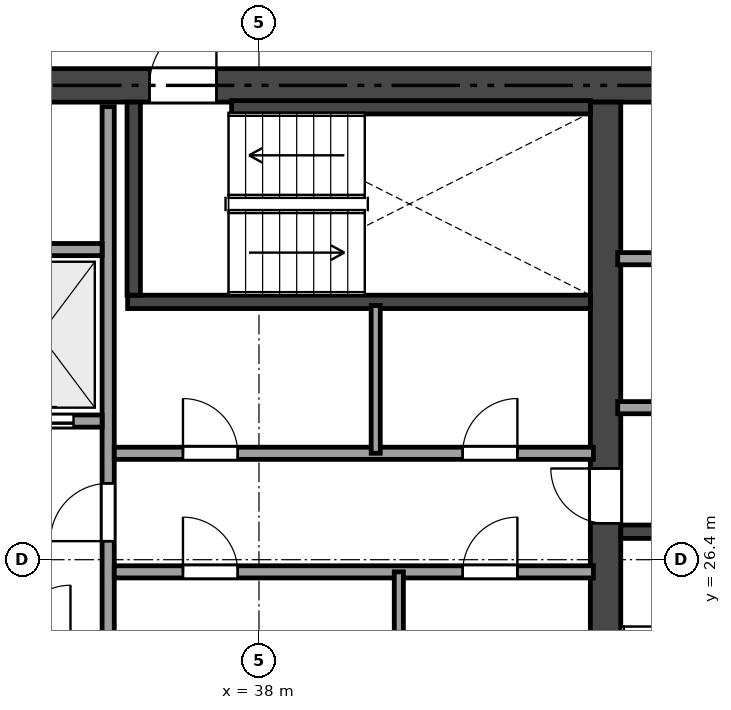
"""IFC4 building model, lengths in metres.
Left out: names, types, materials, properties, quantities, classifications, styles, units other than length and angle.
Written with IfcOpenShell. Run it as: python <this file> out.ifc"""

import sys

from ifc_helpers import new_model, si_unit, direction, frame, frame_2d, origin, place, context, subcontext, project, spatial, rectangle, extrude, element, fill, save


model = new_model("IFC4")
c1 = context("Model", 3, precision=1e-05, world=origin(), true_north=direction((0.0, 1.0)))
c2 = subcontext(c1, "Body", "Model", "MODEL_VIEW")
j1 = project(units=[si_unit("LENGTHUNIT", "METRE"), si_unit("PLANEANGLEUNIT", "RADIAN")], contexts=[c1])
p1 = place(None, origin())
s1 = spatial("IfcSite", under=j1, at=p1, CompositionType="ELEMENT")
p2 = place(p1, origin())
s2 = spatial("IfcBuilding", under=s1, at=p2, CompositionType="ELEMENT")
p3 = place(p2, frame((0.0, 0.0, 289.9)))
s3 = spatial("IfcBuildingStorey", under=s2, at=p3, CompositionType="ELEMENT", Elevation=289.9)
p4 = place(p3, frame((26.525, 34.2, 0.0), z_axis=(0.0, 0.0, 1.0), x_axis=(1.0, 0.0, 0.0)))
e1 = element("IfcWall", 1, at=p4, inside=s3, PredefinedType="SHEAR", context=c2, shape_type="SweptSolid", body=[
    extrude(rectangle(XDim=21.35, YDim=0.55, at=frame_2d((10.675, 0.0))), origin(), (0.0, 0.0, 1.0), 2.58),
])
p5 = place(p4, frame((9.675, 0.0, 0.0)))
e2 = element("IfcOpeningElement", 2, at=p5, cuts=e1, PredefinedType="OPENING", context=c2, shape_type="SweptSolid", body=[
    extrude(rectangle(XDim=1.1, YDim=2.15, at=frame_2d((0.55, 1.075))), frame((0.0, 0.285, 0.0), z_axis=(0.0, -1.0, 0.0), x_axis=(1.0, 0.0, 0.0)), (0.0, 0.0, 1.0), 0.57),
])
p6 = place(p4, frame((1.925, 0.0, 0.0)))
e3 = element("IfcOpeningElement", 3, at=p6, cuts=e1, PredefinedType="OPENING", context=c2, shape_type="SweptSolid", body=[
    extrude(rectangle(XDim=0.9, YDim=2.1, at=frame_2d((0.45, 1.05))), frame((0.0, 0.285, 0.0), z_axis=(0.0, -1.0, 0.0), x_axis=(1.0, 0.0, 0.0)), (0.0, 0.0, 1.0), 0.57),
])
p7 = place(p4, frame((6.225, 0.0, 0.0)))
e4 = element("IfcOpeningElement", 4, at=p7, cuts=e1, PredefinedType="OPENING", context=c2, shape_type="SweptSolid", body=[
    extrude(rectangle(XDim=0.9, YDim=2.1, at=frame_2d((0.45, 1.05))), frame((0.0, 0.285, 0.0), z_axis=(0.0, -1.0, 0.0), x_axis=(1.0, 0.0, 0.0)), (0.0, 0.0, 1.0), 0.57),
])
p8 = place(p3, frame((43.7, 18.875, 0.0), z_axis=(0.0, 0.0, 1.0), x_axis=(0.0, 1.0, 0.0)))
e5 = element("IfcWall", 5, at=p8, inside=s3, PredefinedType="SHEAR", context=c2, shape_type="SweptSolid", body=[
    extrude(rectangle(XDim=15.05, YDim=0.5, at=frame_2d((7.525, 0.0))), origin(), (0.0, 0.0, 1.0), 2.58),
])
p9 = place(p8, frame((8.125, 0.0, 0.0)))
e6 = element("IfcOpeningElement", 6, at=p9, cuts=e5, PredefinedType="OPENING", context=c2, shape_type="SweptSolid", body=[
    extrude(rectangle(XDim=0.9, YDim=2.1, at=frame_2d((0.45, 1.05))), frame((0.0, 0.26, 0.0), z_axis=(0.0, -1.0, 0.0), x_axis=(1.0, 0.0, 0.0)), (0.0, 0.0, 1.0), 0.52),
])
p10 = place(p3, frame((43.95, 26.86, 0.0), z_axis=(0.0, 0.0, 1.0), x_axis=(1.0, 0.0, 0.0)))
e7 = element("IfcWall", 7, at=p10, inside=s3, PredefinedType="SHEAR", context=c2, shape_type="SweptSolid", body=[
    extrude(rectangle(XDim=3.375, YDim=0.22, at=frame_2d((1.688, 0.0))), origin(), (0.0, 0.0, 1.0), 2.58),
])
p11 = place(p3, frame((35.84, 30.64, 0.0), z_axis=(0.0, 0.0, 1.0), x_axis=(1.0, 0.0, 0.0)))
e8 = element("IfcWall", 8, at=p11, inside=s3, PredefinedType="SHEAR", context=c2, shape_type="SweptSolid", body=[
    extrude(rectangle(XDim=7.61, YDim=0.22, at=frame_2d((3.805, 0.0))), origin(), (0.0, 0.0, 1.0), 2.58),
])
p12 = place(p3, frame((35.94, 30.75, 0.0), z_axis=(0.0, 0.0, 1.0), x_axis=(0.0, 1.0, 0.0)))
e9 = element("IfcWall", 9, at=p12, inside=s3, PredefinedType="SHEAR", context=c2, shape_type="SweptSolid", body=[
    extrude(rectangle(XDim=3.175, YDim=0.22, at=frame_2d((1.587, 0.0))), origin(), (0.0, 0.0, 1.0), 2.58),
])
p13 = place(p3, frame((37.55, 33.84, 0.0), z_axis=(0.0, 0.0, 1.0), x_axis=(1.0, 0.0, 0.0)))
e10 = element("IfcWall", 10, at=p13, inside=s3, PredefinedType="SHEAR", context=c2, shape_type="SweptSolid", body=[
    extrude(rectangle(XDim=5.9, YDim=0.22, at=frame_2d((2.95, 0.0))), origin(), (0.0, 0.0, 1.0), 2.58),
])
p14 = place(p3, frame((42.435, 42.747, 0.0), z_axis=(0.0, 0.0, 1.0), x_axis=(0.485411824616, -0.874285628684, 0.0)))
e11 = element("IfcWall", 11, at=p14, inside=s3, PredefinedType="PARAPET", context=c2, shape_type="SweptSolid", body=[
    extrude(rectangle(XDim=23.502, YDim=0.18, at=frame_2d((11.751, 0.0))), origin(), (0.0, 0.0, 1.0), 1.15),
])
p15 = place(p3, frame((43.9, 28.9, 0.0), z_axis=(0.0, 0.0, 1.0), x_axis=(1.0, 0.0, 0.0)))
e12 = element("IfcWall", 12, at=p15, inside=s3, PredefinedType="SOLIDWALL", context=c2, shape_type="SweptSolid", body=[
    extrude(rectangle(XDim=3.35, YDim=0.2, at=frame_2d((1.675, 0.0))), origin(), (0.0, 0.0, 1.0), 2.58),
])
p16 = place(p15, frame((1.15, 0.0, 0.0)))
e13 = element("IfcOpeningElement", 13, at=p16, cuts=e12, PredefinedType="OPENING", context=c2, shape_type="SweptSolid", body=[
    extrude(rectangle(XDim=0.9, YDim=2.1, at=frame_2d((0.45, 1.05))), frame((0.0, 0.11, 0.0), z_axis=(0.0, -1.0, 0.0), x_axis=(1.0, 0.0, 0.0)), (0.0, 0.0, 1.0), 0.22),
])
p17 = place(p3, frame((43.9, 31.35, 0.0), z_axis=(0.0, 0.0, 1.0), x_axis=(1.0, 0.0, 0.0)))
e14 = element("IfcWall", 14, at=p17, inside=s3, PredefinedType="SOLIDWALL", context=c2, shape_type="SweptSolid", body=[
    extrude(rectangle(XDim=3.35, YDim=0.2, at=frame_2d((1.675, 0.0))), origin(), (0.0, 0.0, 1.0), 2.58),
])
p18 = place(p3, frame((35.52, 18.95, 0.0), z_axis=(0.0, 0.0, 1.0), x_axis=(0.0, 1.0, 0.0)))
e15 = element("IfcWall", 15, at=p18, inside=s3, PredefinedType="SOLIDWALL", context=c2, shape_type="SweptSolid", body=[
    extrude(rectangle(XDim=14.9, YDim=0.2, at=frame_2d((7.45, 0.0))), origin(), (0.0, 0.0, 1.0), 2.27),
])
p19 = place(p18, frame((7.755, 0.0, 0.0)))
e16 = element("IfcOpeningElement", 16, at=p19, cuts=e15, PredefinedType="OPENING", context=c2, shape_type="SweptSolid", body=[
    extrude(rectangle(XDim=0.95, YDim=2.15, at=frame_2d((0.475, 1.075))), frame((0.0, 0.11, 0.0), z_axis=(0.0, -1.0, 0.0), x_axis=(1.0, 0.0, 0.0)), (0.0, 0.0, 1.0), 0.22),
])
p20 = place(p18, frame((0.6, 0.0, 0.0)))
e17 = element("IfcOpeningElement", 17, at=p20, cuts=e15, PredefinedType="OPENING", context=c2, shape_type="SweptSolid", body=[
    extrude(rectangle(XDim=0.9, YDim=2.1, at=frame_2d((0.45, 1.05))), frame((0.0, 0.11, 0.0), z_axis=(0.0, -1.0, 0.0), x_axis=(1.0, 0.0, 0.0)), (0.0, 0.0, 1.0), 0.22),
])
p21 = place(p3, frame((31.0, 28.68, 0.0), z_axis=(0.0, 0.0, 1.0), x_axis=(1.0, 0.0, 0.0)))
e18 = element("IfcWall", 18, at=p21, inside=s3, PredefinedType="SOLIDWALL", context=c2, shape_type="SweptSolid", body=[
    extrude(rectangle(XDim=4.42, YDim=0.2, at=frame_2d((2.21, 0.0))), origin(), (0.0, 0.0, 1.0), 2.58),
])
p22 = place(p21, frame((0.6, 0.0, 0.0)))
e19 = element("IfcOpeningElement", 19, at=p22, cuts=e18, PredefinedType="OPENING", context=c2, shape_type="SweptSolid", body=[
    extrude(rectangle(XDim=1.1, YDim=2.15, at=frame_2d((0.55, 1.075))), frame((0.0, 0.11, 0.0), z_axis=(0.0, -1.0, 0.0), x_axis=(1.0, 0.0, 0.0)), (0.0, 0.0, 1.0), 0.22),
])
p23 = place(p21, frame((2.85, 0.0, 0.0)))
e20 = element("IfcOpeningElement", 20, at=p23, cuts=e18, PredefinedType="OPENING", context=c2, shape_type="SweptSolid", body=[
    extrude(rectangle(XDim=1.1, YDim=2.15, at=frame_2d((0.55, 1.075))), frame((0.0, 0.11, 0.0), z_axis=(0.0, -1.0, 0.0), x_axis=(1.0, 0.0, 0.0)), (0.0, 0.0, 1.0), 0.22),
])
p24 = place(p3, frame((31.0, 31.5, 0.0), z_axis=(0.0, 0.0, 1.0), x_axis=(1.0, 0.0, 0.0)))
e21 = element("IfcWall", 21, at=p24, inside=s3, PredefinedType="SOLIDWALL", context=c2, shape_type="SweptSolid", body=[
    extrude(rectangle(XDim=4.42, YDim=0.2, at=frame_2d((2.21, 0.0))), origin(), (0.0, 0.0, 1.0), 2.58),
])
p25 = place(p3, frame((35.62, 28.15, 0.0), z_axis=(0.0, 0.0, 1.0), x_axis=(1.0, 0.0, 0.0)))
e22 = element("IfcWall", 22, at=p25, inside=s3, PredefinedType="SOLIDWALL", context=c2, shape_type="SweptSolid", body=[
    extrude(rectangle(XDim=7.88, YDim=0.2, at=frame_2d((3.94, 0.0))), origin(), (0.0, 0.0, 1.0), 2.58),
])
p26 = place(p25, frame((1.13, 0.0, 0.0)))
e23 = element("IfcOpeningElement", 23, at=p26, cuts=e22, PredefinedType="OPENING", context=c2, shape_type="SweptSolid", body=[
    extrude(rectangle(XDim=0.9, YDim=2.1, at=frame_2d((0.45, 1.05))), frame((0.0, 0.11, 0.0), z_axis=(0.0, -1.0, 0.0), x_axis=(1.0, 0.0, 0.0)), (0.0, 0.0, 1.0), 0.22),
])
p27 = place(p25, frame((5.73, 0.0, 0.0)))
e24 = element("IfcOpeningElement", 24, at=p27, cuts=e22, PredefinedType="OPENING", context=c2, shape_type="SweptSolid", body=[
    extrude(rectangle(XDim=0.9, YDim=2.1, at=frame_2d((0.45, 1.05))), frame((0.0, 0.11, 0.0), z_axis=(0.0, -1.0, 0.0), x_axis=(1.0, 0.0, 0.0)), (0.0, 0.0, 1.0), 0.22),
])
p28 = place(p3, frame((35.62, 26.2, 0.0), z_axis=(0.0, 0.0, 1.0), x_axis=(1.0, 0.0, 0.0)))
e25 = element("IfcWall", 25, at=p28, inside=s3, PredefinedType="SOLIDWALL", context=c2, shape_type="SweptSolid", body=[
    extrude(rectangle(XDim=7.88, YDim=0.2, at=frame_2d((3.94, 0.0))), origin(), (0.0, 0.0, 1.0), 2.58),
])
p29 = place(p28, frame((1.13, 0.0, 0.0)))
e26 = element("IfcOpeningElement", 26, at=p29, cuts=e25, PredefinedType="OPENING", context=c2, shape_type="SweptSolid", body=[
    extrude(rectangle(XDim=0.9, YDim=2.1, at=frame_2d((0.45, 1.05))), frame((0.0, 0.11, 0.0), z_axis=(0.0, -1.0, 0.0), x_axis=(1.0, 0.0, 0.0)), (0.0, 0.0, 1.0), 0.22),
])
p30 = place(p28, frame((5.73, 0.0, 0.0)))
e27 = element("IfcOpeningElement", 27, at=p30, cuts=e25, PredefinedType="OPENING", context=c2, shape_type="SweptSolid", body=[
    extrude(rectangle(XDim=0.9, YDim=2.1, at=frame_2d((0.45, 1.05))), frame((0.0, 0.11, 0.0), z_axis=(0.0, -1.0, 0.0), x_axis=(1.0, 0.0, 0.0)), (0.0, 0.0, 1.0), 0.22),
])
p31 = place(p3, frame((39.92, 28.15, 0.0), z_axis=(0.0, 0.0, 1.0), x_axis=(0.0, 1.0, 0.0)))
e28 = element("IfcWall", 28, at=p31, inside=s3, PredefinedType="PARTITIONING", context=c2, shape_type="SweptSolid", body=[
    extrude(rectangle(XDim=2.43, YDim=0.15, at=frame_2d((1.215, 0.0))), origin(), (0.0, 0.0, 1.0), 2.58),
])
p32 = place(p3, frame((40.3, 23.65, 0.0), z_axis=(0.0, 0.0, 1.0), x_axis=(0.0, 1.0, 0.0)))
e29 = element("IfcWall", 29, at=p32, inside=s3, PredefinedType="PARTITIONING", context=c2, shape_type="SweptSolid", body=[
    extrude(rectangle(XDim=2.55, YDim=0.15, at=frame_2d((1.275, 0.0))), origin(), (0.0, 0.0, 1.0), 2.101),
])
p33 = place(p5, origin())
e30 = element("IfcDoor", 30, at=p33, inside=s3, OperationType="SINGLE_SWING_RIGHT", PredefinedType="DOOR", context=c2, shape_type="SweptSolid", body=[
    extrude(rectangle(XDim=1.1, YDim=2.15, at=frame_2d((0.55, 1.075))), frame((0.0, 0.025, 0.0), z_axis=(0.0, -1.0, 0.0), x_axis=(1.0, 0.0, 0.0)), (0.0, 0.0, 1.0), 0.05),
])
fill(e2, e30)
p34 = place(p19, origin())
e31 = element("IfcDoor", 31, at=p34, inside=s3, OperationType="SINGLE_SWING_LEFT", PredefinedType="DOOR", context=c2, shape_type="SweptSolid", body=[
    extrude(rectangle(XDim=0.95, YDim=2.15, at=frame_2d((0.475, 1.075))), frame((0.0, 0.025, 0.0), z_axis=(0.0, -1.0, 0.0), x_axis=(1.0, 0.0, 0.0)), (0.0, 0.0, 1.0), 0.05),
])
fill(e16, e31)
p35 = place(p9, origin())
e32 = element("IfcDoor", 32, at=p35, inside=s3, OperationType="SINGLE_SWING_RIGHT", PredefinedType="DOOR", context=c2, shape_type="SweptSolid", body=[
    extrude(rectangle(XDim=0.9, YDim=2.1, at=frame_2d((0.45, 1.05))), frame((0.0, 0.025, 0.0), z_axis=(0.0, -1.0, 0.0), x_axis=(1.0, 0.0, 0.0)), (0.0, 0.0, 1.0), 0.05),
])
fill(e6, e32)
p36 = place(p29, origin())
e33 = element("IfcDoor", 33, at=p36, inside=s3, OperationType="SINGLE_SWING_LEFT", PredefinedType="DOOR", context=c2, shape_type="SweptSolid", body=[
    extrude(rectangle(XDim=0.9, YDim=2.1, at=frame_2d((0.45, 1.05))), frame((0.0, 0.025, 0.0), z_axis=(0.0, -1.0, 0.0), x_axis=(1.0, 0.0, 0.0)), (0.0, 0.0, 1.0), 0.05),
])
fill(e26, e33)
p37 = place(p30, origin())
e34 = element("IfcDoor", 34, at=p37, inside=s3, OperationType="SINGLE_SWING_RIGHT", PredefinedType="DOOR", context=c2, shape_type="SweptSolid", body=[
    extrude(rectangle(XDim=0.9, YDim=2.1, at=frame_2d((0.45, 1.05))), frame((0.0, 0.025, 0.0), z_axis=(0.0, -1.0, 0.0), x_axis=(1.0, 0.0, 0.0)), (0.0, 0.0, 1.0), 0.05),
])
fill(e27, e34)
p38 = place(p26, origin())
e35 = element("IfcDoor", 35, at=p38, inside=s3, OperationType="SINGLE_SWING_LEFT", PredefinedType="DOOR", context=c2, shape_type="SweptSolid", body=[
    extrude(rectangle(XDim=0.9, YDim=2.1, at=frame_2d((0.45, 1.05))), frame((0.0, 0.025, 0.0), z_axis=(0.0, -1.0, 0.0), x_axis=(1.0, 0.0, 0.0)), (0.0, 0.0, 1.0), 0.05),
])
fill(e23, e35)
p39 = place(p27, origin())
e36 = element("IfcDoor", 36, at=p39, inside=s3, OperationType="SINGLE_SWING_RIGHT", PredefinedType="DOOR", context=c2, shape_type="SweptSolid", body=[
    extrude(rectangle(XDim=0.9, YDim=2.1, at=frame_2d((0.45, 1.05))), frame((0.0, 0.025, 0.0), z_axis=(0.0, -1.0, 0.0), x_axis=(1.0, 0.0, 0.0)), (0.0, 0.0, 1.0), 0.05),
])
fill(e24, e36)
p40 = place(p23, origin())
e37 = element("IfcDoor", 37, at=p40, inside=s3, OperationType="SLIDING_TO_LEFT", PredefinedType="DOOR", context=c2, shape_type="SweptSolid", body=[
    extrude(rectangle(XDim=1.1, YDim=2.15, at=frame_2d((0.55, 1.075))), frame((0.0, 0.025, 0.0), z_axis=(0.0, -1.0, 0.0), x_axis=(1.0, 0.0, 0.0)), (0.0, 0.0, 1.0), 0.05),
])
fill(e20, e37)
save(model, sys.argv[1])
